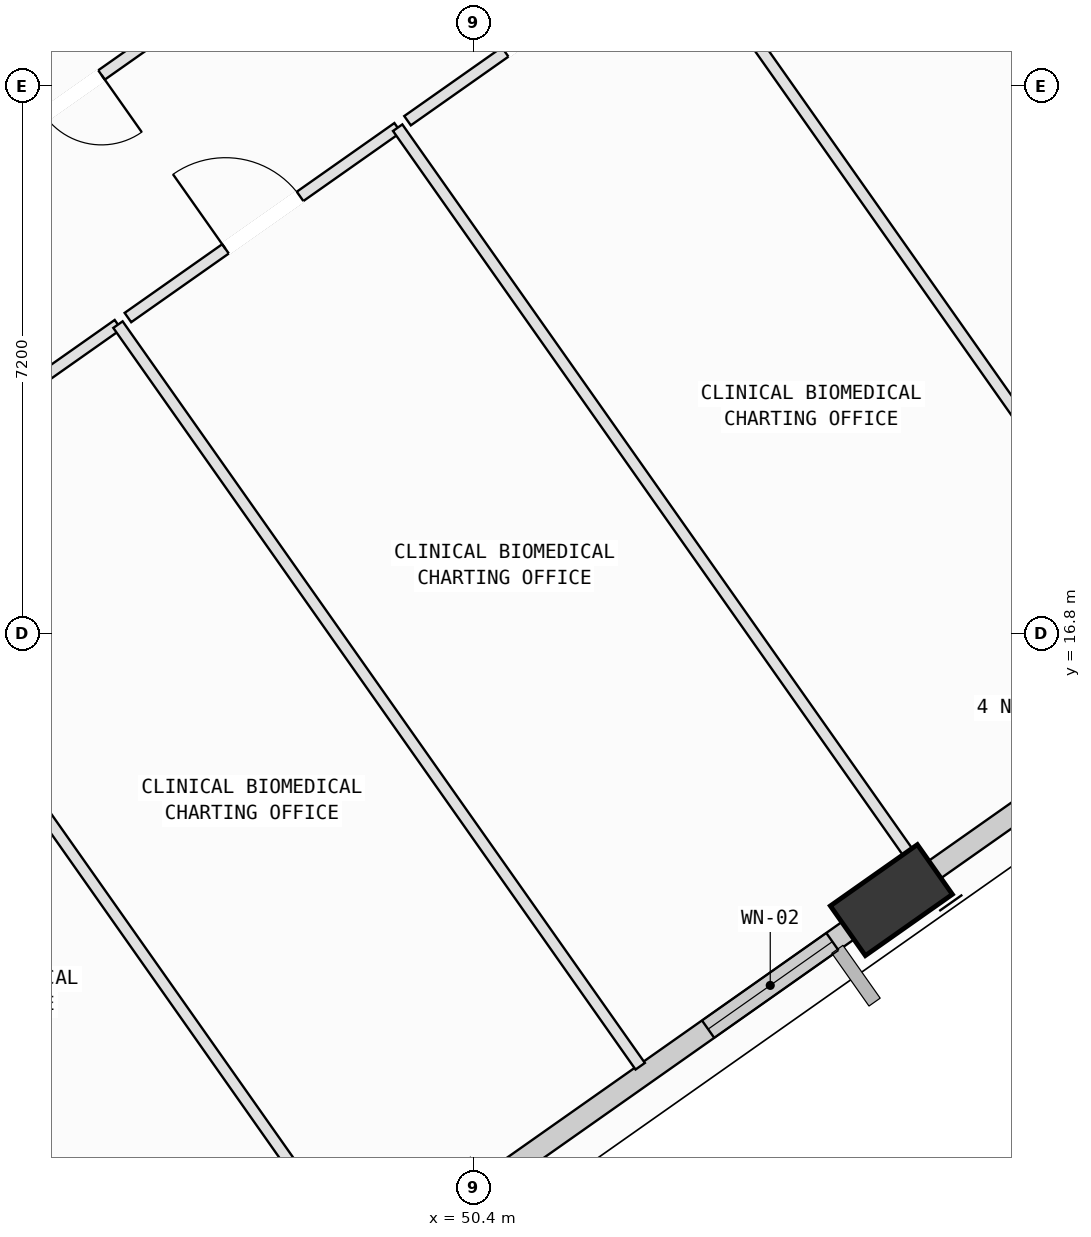
"""IFC4 building model, lengths in metres.
Left out: names, types, materials, properties, quantities, classifications, styles, units other than length and angle.
Written with IfcOpenShell. Run it as: python <this file> out.ifc"""

import sys

from ifc_helpers import new_model, si_unit, direction, frame, frame_2d, origin, origin_2d, place, context, subcontext, project, spatial, rectangle, extrude, element, fill, save


model = new_model("IFC4")
c1 = context("Model", 3, precision=1e-05, world=origin(), true_north=direction((0.0, 1.0)))
c2 = subcontext(c1, "Body", "Model", "MODEL_VIEW")
j1 = project(units=[si_unit("LENGTHUNIT", "METRE"), si_unit("PLANEANGLEUNIT", "RADIAN")], contexts=[c1])
p1 = place(None, origin())
s1 = spatial("IfcSite", under=j1, at=p1, CompositionType="ELEMENT")
p2 = place(p1, origin())
s2 = spatial("IfcBuilding", under=s1, at=p2, CompositionType="ELEMENT")
p3 = place(p2, frame((0.0, 0.0, 173.8)))
s3 = spatial("IfcBuildingStorey", under=s2, at=p3, CompositionType="ELEMENT", Elevation=173.8)
p4 = place(p3, frame((55.895, 13.286, 0.002), z_axis=(0.046726970601, 0.092299438677, 0.994634306586), x_axis=(-0.988133036877, -0.141582839923, 0.059560061042)))
e1 = element("IfcColumn", 1, at=p4, inside=s3, PredefinedType="COLUMN", context=c2, shape_type="SweptSolid", body=[
    extrude(rectangle(XDim=1.4, YDim=0.8, at=origin_2d()), origin(), (0.0, 0.0, 1.0), 4.018),
])
p5 = place(p3, frame((55.647, 13.111, 0.0), z_axis=(0.0, 0.0, 1.0), x_axis=(-0.817651715205, -0.575713186077, 0.0)))
e2 = element("IfcWall", 2, at=p5, inside=s3, PredefinedType="SOLIDWALL", context=c2, shape_type="SweptSolid", body=[
    extrude(rectangle(XDim=6.218, YDim=0.28, at=frame_2d((3.109, 0.0))), origin(), (0.0, 0.0, 1.0), 3.265),
])
p6 = place(p5, frame((0.646, 0.0, 0.75)))
e3 = element("IfcOpeningElement", 3, at=p6, cuts=e2, PredefinedType="OPENING", context=c2, shape_type="SweptSolid", body=[
    extrude(rectangle(XDim=2.0, YDim=1.95, at=frame_2d((1.0, 0.975))), frame((0.0, 0.15, 0.0), z_axis=(0.0, -1.0, 0.0), x_axis=(1.0, 0.0, 0.0)), (0.0, 0.0, 1.0), 0.3),
])
p7 = place(p3, frame((61.546, 17.265, 0.0), z_axis=(0.0, 0.0, 1.0), x_axis=(-0.817633903832, -0.575738481695, 0.0)))
e4 = element("IfcWall", 4, at=p7, inside=s3, PredefinedType="SOLIDWALL", context=c2, shape_type="SweptSolid", body=[
    extrude(rectangle(XDim=6.242, YDim=0.28, at=frame_2d((3.121, 0.0))), origin(), (0.0, 0.0, 1.0), 3.265),
])
p8 = place(p7, frame((3.343, 0.0, 0.75)))
e5 = element("IfcOpeningElement", 5, at=p8, cuts=e4, PredefinedType="OPENING", context=c2, shape_type="SweptSolid", body=[
    extrude(rectangle(XDim=1.4, YDim=1.85, at=frame_2d((0.7, 0.925))), frame((0.0, 0.15, 0.0), z_axis=(0.0, -1.0, 0.0), x_axis=(1.0, 0.0, 0.0)), (0.0, 0.0, 1.0), 0.3),
])
for number, where, z_axis, x_axis in (
    (6, (38.36, 15.677, 0.0), (0.0, 0.0, 1.0), (0.576, -0.818, 0.0)),
    (7, (42.04, 18.268, 0.0), (0.0, 0.0, 1.0), (0.576, -0.818, 0.0)),
):
    element("IfcWall", number, at=place(p3, frame(where, z_axis=z_axis, x_axis=x_axis)), inside=s3, PredefinedType="PARTITIONING", context=c2, shape_type="SweptSolid", body=[
        extrude(rectangle(XDim=11.935, YDim=0.15, at=frame_2d((5.968, 0.0))), origin(), (0.0, 0.0, 1.0), 3.78),
    ])
p9 = place(p3, frame((42.171, 18.36, 0.0), z_axis=(0.0, 0.0, 1.0), x_axis=(0.81769852076, 0.575646705147, 0.0)))
e8 = element("IfcWall", 8, at=p9, inside=s3, PredefinedType="PARTITIONING", context=c2, shape_type="SweptSolid", body=[
    extrude(rectangle(XDim=4.339, YDim=0.15, at=frame_2d((2.169, 0.0))), origin(), (0.0, 0.0, 1.0), 3.78),
])
p10 = place(p9, frame((1.57, 0.0, 0.0)))
e9 = element("IfcOpeningElement", 9, at=p10, cuts=e8, PredefinedType="OPENING", context=c2, shape_type="SweptSolid", body=[
    extrude(rectangle(XDim=1.2, YDim=2.15, at=frame_2d((0.6, 1.075))), frame((0.0, 0.085, 0.0), z_axis=(0.0, -1.0, 0.0), x_axis=(1.0, 0.0, 0.0)), (0.0, 0.0, 1.0), 0.17),
])
p11 = place(p3, frame((45.719, 20.858, 0.0), z_axis=(0.0, 0.0, 1.0), x_axis=(0.575744719848, -0.817629511189, 0.0)))
e10 = element("IfcWall", 10, at=p11, inside=s3, PredefinedType="PARTITIONING", context=c2, shape_type="SweptSolid", body=[
    extrude(rectangle(XDim=11.934, YDim=0.15, at=frame_2d((5.967, 0.0))), origin(), (0.0, 0.0, 1.0), 3.78),
])
p12 = place(p3, frame((45.85, 20.951, 0.0), z_axis=(0.0, 0.0, 1.0), x_axis=(0.817727963856, 0.575604879346, 0.0)))
e11 = element("IfcWall", 11, at=p12, inside=s3, PredefinedType="PARTITIONING", context=c2, shape_type="SweptSolid", body=[
    extrude(rectangle(XDim=4.34, YDim=0.15, at=frame_2d((2.17, 0.0))), origin(), (0.0, 0.0, 1.0), 3.78),
])
p13 = place(p12, frame((1.57, 0.0, 0.0)))
e12 = element("IfcOpeningElement", 12, at=p13, cuts=e11, PredefinedType="OPENING", context=c2, shape_type="SweptSolid", body=[
    extrude(rectangle(XDim=1.2, YDim=2.15, at=frame_2d((0.6, 1.075))), frame((0.0, 0.085, 0.0), z_axis=(0.0, -1.0, 0.0), x_axis=(1.0, 0.0, 0.0)), (0.0, 0.0, 1.0), 0.17),
])
p14 = place(p3, frame((49.399, 23.449, 0.0), z_axis=(0.0, 0.0, 1.0), x_axis=(0.575704672979, -0.817657709259, 0.0)))
e13 = element("IfcWall", 13, at=p14, inside=s3, PredefinedType="PARTITIONING", context=c2, shape_type="SweptSolid", body=[
    extrude(rectangle(XDim=12.279, YDim=0.15, at=frame_2d((6.14, 0.0))), origin(), (0.0, 0.0, 1.0), 3.78),
])
p15 = place(p3, frame((56.468, 13.409, 0.0), z_axis=(0.0, 0.0, 1.0), x_axis=(-0.817786213284, -0.575522118917, 0.0)))
e14 = element("IfcWall", 14, at=p15, inside=s3, PredefinedType="PARTITIONING", context=c2, shape_type="SweptSolid", body=[
    extrude(rectangle(XDim=0.843, YDim=0.15, at=frame_2d((0.421, 0.0))), origin(), (0.0, 0.0, 1.0), 3.265),
])
p16 = place(p3, frame((49.529, 23.541, 0.0), z_axis=(0.0, 0.0, 1.0), x_axis=(0.81762204879, 0.575755317241, 0.0)))
e15 = element("IfcWall", 15, at=p16, inside=s3, PredefinedType="PARTITIONING", context=c2, shape_type="SweptSolid", body=[
    extrude(rectangle(XDim=4.34, YDim=0.15, at=frame_2d((2.17, 0.0))), origin(), (0.0, 0.0, 1.0), 3.065),
])
p17 = place(p16, frame((1.57, 0.0, 0.0)))
e16 = element("IfcOpeningElement", 16, at=p17, cuts=e15, PredefinedType="OPENING", context=c2, shape_type="SweptSolid", body=[
    extrude(rectangle(XDim=1.2, YDim=2.15, at=frame_2d((0.6, 1.075))), frame((0.0, 0.085, 0.0), z_axis=(0.0, -1.0, 0.0), x_axis=(1.0, 0.0, 0.0)), (0.0, 0.0, 1.0), 0.17),
])
p18 = place(p3, frame((53.078, 26.04, 0.0), z_axis=(0.0, 0.0, 1.0), x_axis=(0.575696572392, -0.817663412742, 0.0)))
e17 = element("IfcWall", 17, at=p18, inside=s3, PredefinedType="PARTITIONING", context=c2, shape_type="SweptSolid", body=[
    extrude(rectangle(XDim=11.935, YDim=0.15, at=frame_2d((5.968, 0.0))), origin(), (0.0, 0.0, 1.0), 3.78),
])
p19 = place(p3, frame((56.757, 28.631, 0.0), z_axis=(0.0, 0.0, 1.0), x_axis=(0.575730217861, -0.817639722764, 0.0)))
e18 = element("IfcWall", 18, at=p19, inside=s3, PredefinedType="PARTITIONING", context=c2, shape_type="SweptSolid", body=[
    extrude(rectangle(XDim=9.831, YDim=0.15, at=frame_2d((4.916, 0.0))), origin(), (0.0, 0.0, 1.0), 3.78),
])
p20 = place(p19, frame((4.485, 0.0, 0.0)))
e19 = element("IfcOpeningElement", 19, at=p20, cuts=e18, PredefinedType="OPENING", context=c2, shape_type="SweptSolid", body=[
    extrude(rectangle(XDim=0.86, YDim=2.06, at=frame_2d((0.43, 1.03))), frame((0.0, 0.085, 0.0), z_axis=(0.0, -1.0, 0.0), x_axis=(1.0, 0.0, 0.0)), (0.0, 0.0, 1.0), 0.17),
])
p21 = place(p3, frame((47.423, 25.495, 0.0), z_axis=(0.0, 0.0, 1.0), x_axis=(-0.817638200952, -0.5757323791, 0.0)))
e20 = element("IfcWall", 20, at=p21, inside=s3, PredefinedType="PARTITIONING", context=c2, shape_type="SweptSolid", body=[
    extrude(rectangle(XDim=5.617, YDim=0.15, at=frame_2d((2.809, 0.0))), origin(), (0.0, 0.0, 1.0), 3.78),
])
p22 = place(p21, frame((2.349, 0.0, 0.0)))
e21 = element("IfcOpeningElement", 21, at=p22, cuts=e20, PredefinedType="OPENING", context=c2, shape_type="SweptSolid", body=[
    extrude(rectangle(XDim=0.92, YDim=2.1, at=frame_2d((0.46, 1.05))), frame((0.0, 0.085, 0.0), z_axis=(0.0, -1.0, 0.0), x_axis=(1.0, 0.0, 0.0)), (0.0, 0.0, 1.0), 0.17),
])
p23 = place(p6, origin())
e22 = element("IfcWindow", 22, at=p23, inside=s3, PartitioningType="SINGLE_PANEL", PredefinedType="WINDOW", context=c2, shape_type="SweptSolid", body=[
    extrude(rectangle(XDim=2.0, YDim=1.95, at=frame_2d((1.0, 0.975))), frame((0.0, 0.03, 0.0), z_axis=(0.0, -1.0, 0.0), x_axis=(1.0, 0.0, 0.0)), (0.0, 0.0, 1.0), 0.06),
])
fill(e3, e22)
p24 = place(p13, origin())
e23 = element("IfcDoor", 23, at=p24, inside=s3, OperationType="SINGLE_SWING_LEFT", PredefinedType="DOOR", context=c2, shape_type="SweptSolid", body=[
    extrude(rectangle(XDim=1.2, YDim=2.15, at=frame_2d((0.6, 1.075))), frame((0.0, 0.025, 0.0), z_axis=(0.0, -1.0, 0.0), x_axis=(1.0, 0.0, 0.0)), (0.0, 0.0, 1.0), 0.05),
])
fill(e12, e23)
p25 = place(p17, origin())
e24 = element("IfcDoor", 24, at=p25, inside=s3, OperationType="SINGLE_SWING_RIGHT", PredefinedType="DOOR", context=c2, shape_type="SweptSolid", body=[
    extrude(rectangle(XDim=1.2, YDim=2.15, at=frame_2d((0.6, 1.075))), frame((0.0, 0.025, 0.0), z_axis=(0.0, -1.0, 0.0), x_axis=(1.0, 0.0, 0.0)), (0.0, 0.0, 1.0), 0.05),
])
fill(e16, e24)
p26 = place(p22, origin())
e25 = element("IfcDoor", 25, at=p26, inside=s3, OperationType="SINGLE_SWING_LEFT", PredefinedType="DOOR", context=c2, shape_type="SweptSolid", body=[
    extrude(rectangle(XDim=0.92, YDim=2.1, at=frame_2d((0.46, 1.05))), frame((0.0, 0.025, 0.0), z_axis=(0.0, -1.0, 0.0), x_axis=(1.0, 0.0, 0.0)), (0.0, 0.0, 1.0), 0.05),
])
fill(e21, e25)
save(model, sys.argv[1])
